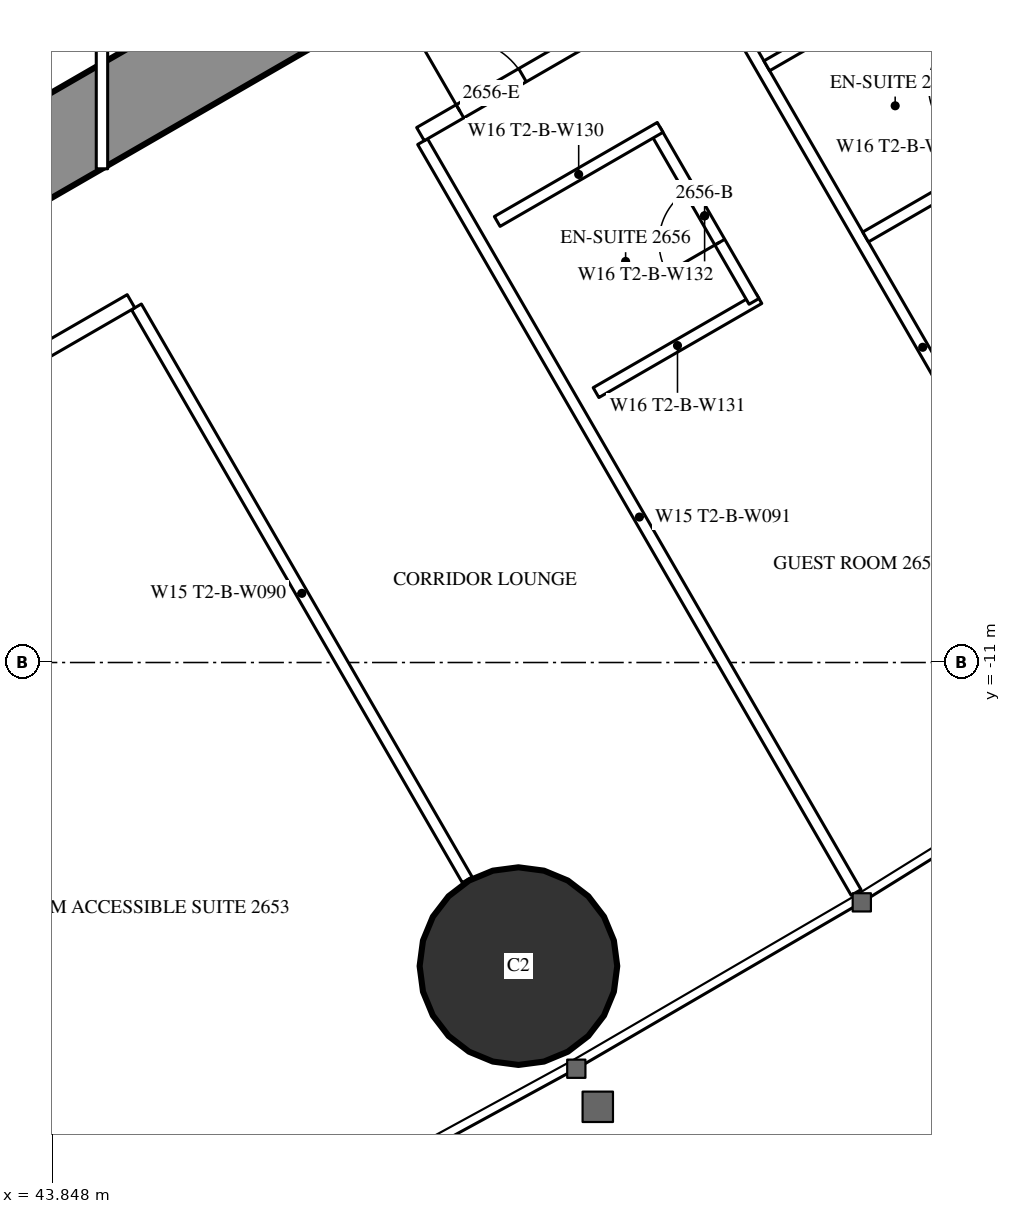
"""IFC4 building model, lengths in metres.
Left out: names, types, materials, properties, quantities, classifications, styles, units other than length and angle.
Written with IfcOpenShell. Run it as: python <this file> out.ifc"""

import sys

from ifc_helpers import new_model, si_unit, direction, frame, frame_2d, origin, origin_2d, place, context, subcontext, project, spatial, rectangle, hollow_circle, extrude, element, fill, save


model = new_model("IFC4")
c1 = context("Model", 3, precision=1e-05, world=origin(), true_north=direction((0.0, 1.0)))
c2 = subcontext(c1, "Body", "Model", "MODEL_VIEW")
j1 = project(units=[si_unit("LENGTHUNIT", "METRE"), si_unit("PLANEANGLEUNIT", "RADIAN")], contexts=[c1])
p1 = place(None, origin())
s1 = spatial("IfcSite", under=j1, at=p1, CompositionType="ELEMENT")
p2 = place(p1, origin())
s2 = spatial("IfcBuilding", under=s1, at=p2, CompositionType="ELEMENT")
p3 = place(p2, frame((0.0, 0.0, 101.1)))
s3 = spatial("IfcBuildingStorey", under=s2, at=p3, CompositionType="ELEMENT", Elevation=101.1)
p4 = place(p3, frame((49.979, -14.994, 0.0), z_axis=(0.0, 0.0, 1.0), x_axis=(1.0, 0.0, 0.0)))
e1 = element("IfcColumn", 1, at=p4, inside=s3, PredefinedType="COLUMN", context=c2, shape_type="SweptSolid", body=[
    extrude(hollow_circle(Radius=1.3, WallThickness=0.1, at=origin_2d()), origin(), (0.0, 0.0, 1.0), 3.5),
])
p5 = place(p3, frame((27.2, -13.8, 0.0), z_axis=(0.0, 0.0, 1.0), x_axis=(0.866027159892, 0.499996958321, 0.0)))
e2 = element("IfcWall", 2, at=p5, inside=s3, PredefinedType="SHEAR", context=c2, shape_type="SweptSolid", body=[
    extrude(rectangle(XDim=27.947, YDim=1.2, at=frame_2d((13.973, 0.0))), origin(), (0.0, 0.0, 1.0), 3.5),
])
p6 = place(p5, frame((4.6, 0.0, 0.0)))
e3 = element("IfcOpeningElement", 3, at=p6, cuts=e2, PredefinedType="OPENING", context=c2, shape_type="SweptSolid", body=[
    extrude(rectangle(XDim=1.0, YDim=2.2, at=frame_2d((0.5, 1.1))), frame((0.0, 0.61, 0.0), z_axis=(0.0, -1.0, 0.0), x_axis=(1.0, 0.0, 0.0)), (0.0, 0.0, 1.0), 1.22),
])
p7 = place(p5, frame((13.395, 0.0, 0.0)))
e4 = element("IfcOpeningElement", 4, at=p7, cuts=e2, PredefinedType="OPENING", context=c2, shape_type="SweptSolid", body=[
    extrude(rectangle(XDim=1.8, YDim=2.2, at=frame_2d((0.9, 1.1))), frame((0.0, 0.61, 0.0), z_axis=(0.0, -1.0, 0.0), x_axis=(1.0, 0.0, 0.0)), (0.0, 0.0, 1.0), 1.22),
])
p8 = place(p3, frame((44.954, -6.321, 0.0), z_axis=(0.0, 0.0, 1.0), x_axis=(0.500018676722, -0.866014620505, 0.0)))
e5 = element("IfcWall", 5, at=p8, inside=s3, PredefinedType="PARTITIONING", context=c2, shape_type="SweptSolid", body=[
    extrude(rectangle(XDim=8.704, YDim=0.15, at=frame_2d((4.352, 0.0))), origin(), (0.0, 0.0, 1.0), 2.2),
])
p9 = place(p3, frame((48.719, -4.147, 0.0), z_axis=(0.0, 0.0, 1.0), x_axis=(0.499990498062, -0.866030889661, 0.0)))
e6 = element("IfcWall", 6, at=p9, inside=s3, PredefinedType="PARTITIONING", context=c2, shape_type="SweptSolid", body=[
    extrude(rectangle(XDim=11.406, YDim=0.15, at=frame_2d((5.703, 0.0))), origin(), (0.0, 0.0, 1.0), 3.25),
])
p10 = place(p3, frame((52.481, -1.975, 0.0), z_axis=(0.0, 0.0, 1.0), x_axis=(0.500003867771, -0.866023170714, 0.0)))
e7 = element("IfcWall", 7, at=p10, inside=s3, PredefinedType="PARTITIONING", context=c2, shape_type="SweptSolid", body=[
    extrude(rectangle(XDim=11.265, YDim=0.15, at=frame_2d((5.632, 0.0))), origin(), (0.0, 0.0, 1.0), 3.25),
])
p11 = place(p3, frame((37.96, -10.243, 0.0), z_axis=(0.0, 0.0, 1.0), x_axis=(0.86603350054, 0.499985975746, 0.0)))
e8 = element("IfcWall", 8, at=p11, inside=s3, PredefinedType="PARTITIONING", context=c2, shape_type="SweptSolid", body=[
    extrude(rectangle(XDim=7.993, YDim=0.2, at=frame_2d((3.997, 0.0))), origin(), (0.0, 0.0, 1.0), 3.25),
])
p12 = place(p11, frame((3.35, 0.0, 0.0)))
e9 = element("IfcOpeningElement", 9, at=p12, cuts=e8, PredefinedType="OPENING", context=c2, shape_type="SweptSolid", body=[
    extrude(rectangle(XDim=1.0, YDim=2.2, at=frame_2d((0.5, 1.1))), frame((0.0, 0.11, 0.0), z_axis=(0.0, -1.0, 0.0), x_axis=(1.0, 0.0, 0.0)), (0.0, 0.0, 1.0), 0.22),
])
p13 = place(p3, frame((48.69, -4.048, 0.0), z_axis=(0.0, 0.0, 1.0), x_axis=(0.866026410209, 0.499998256818, 0.0)))
e10 = element("IfcWall", 10, at=p13, inside=s3, PredefinedType="PARTITIONING", context=c2, shape_type="SweptSolid", body=[
    extrude(rectangle(XDim=8.097, YDim=0.2, at=frame_2d((4.048, 0.0))), origin(), (0.0, 0.0, 1.0), 3.25),
])
p14 = place(p13, frame((0.6, 0.0, 0.0)))
e11 = element("IfcOpeningElement", 11, at=p14, cuts=e10, PredefinedType="OPENING", context=c2, shape_type="SweptSolid", body=[
    extrude(rectangle(XDim=0.95, YDim=2.2, at=frame_2d((0.475, 1.1))), frame((0.0, 0.11, 0.0), z_axis=(0.0, -1.0, 0.0), x_axis=(1.0, 0.0, 0.0)), (0.0, 0.0, 1.0), 0.22),
])
p15 = place(p13, frame((4.695, 0.0, 0.0)))
e12 = element("IfcOpeningElement", 12, at=p15, cuts=e10, PredefinedType="OPENING", context=c2, shape_type="SweptSolid", body=[
    extrude(rectangle(XDim=0.95, YDim=2.2, at=frame_2d((0.475, 1.1))), frame((0.0, 0.11, 0.0), z_axis=(0.0, -1.0, 0.0), x_axis=(1.0, 0.0, 0.0)), (0.0, 0.0, 1.0), 0.22),
])
p16 = place(p3, frame((51.0, -7.449, 0.0), z_axis=(0.0, 0.0, 1.0), x_axis=(0.866006523861, 0.500032699561, 0.0)))
e13 = element("IfcWall", 13, at=p16, inside=s3, PredefinedType="PARTITIONING", context=c2, shape_type="SweptSolid", body=[
    extrude(rectangle(XDim=2.475, YDim=0.15, at=frame_2d((1.237, 0.0))), origin(), (0.0, 0.0, 1.0), 3.25),
])
p17 = place(p3, frame((51.778, -3.998, 0.0), z_axis=(0.0, 0.0, 1.0), x_axis=(0.500047596559, -0.865997922154, 0.0)))
e14 = element("IfcWall", 14, at=p17, inside=s3, PredefinedType="PARTITIONING", context=c2, shape_type="SweptSolid", body=[
    extrude(rectangle(XDim=2.6, YDim=0.15, at=frame_2d((1.3, 0.0))), origin(), (0.0, 0.0, 1.0), 3.25),
])
p18 = place(p17, frame((0.9, 0.0, 0.0)))
e15 = element("IfcOpeningElement", 15, at=p18, cuts=e14, PredefinedType="OPENING", context=c2, shape_type="SweptSolid", body=[
    extrude(rectangle(XDim=0.8, YDim=2.2, at=frame_2d((0.4, 1.1))), frame((0.0, 0.085, 0.0), z_axis=(0.0, -1.0, 0.0), x_axis=(1.0, 0.0, 0.0)), (0.0, 0.0, 1.0), 0.17),
])
for number, where, z_axis, x_axis in (
    (16, (49.7, -5.198, 0.0), (0.0, 0.0, 1.0), (0.866, 0.5, 0.0)),
    (17, (54.546, -5.402, 0.0), (0.0, 0.0, 1.0), (0.866, 0.5, 0.0)),
):
    element("IfcWall", number, at=place(p3, frame(where, z_axis=z_axis, x_axis=x_axis)), inside=s3, PredefinedType="PARTITIONING", context=c2, shape_type="SweptSolid", body=[
        extrude(rectangle(XDim=2.475, YDim=0.15, at=frame_2d((1.237, 0.0))), origin(), (0.0, 0.0, 1.0), 3.25),
    ])
p19 = place(p3, frame((55.325, -1.95, 0.0), z_axis=(0.0, 0.0, 1.0), x_axis=(0.500006934395, -0.866021400173, 0.0)))
e18 = element("IfcWall", 18, at=p19, inside=s3, PredefinedType="PARTITIONING", context=c2, shape_type="SweptSolid", body=[
    extrude(rectangle(XDim=2.6, YDim=0.15, at=frame_2d((1.3, 0.0))), origin(), (0.0, 0.0, 1.0), 3.25),
])
p20 = place(p19, frame((0.9, 0.0, 0.0)))
e19 = element("IfcOpeningElement", 19, at=p20, cuts=e18, PredefinedType="OPENING", context=c2, shape_type="SweptSolid", body=[
    extrude(rectangle(XDim=0.8, YDim=2.2, at=frame_2d((0.4, 1.1))), frame((0.0, 0.085, 0.0), z_axis=(0.0, -1.0, 0.0), x_axis=(1.0, 0.0, 0.0)), (0.0, 0.0, 1.0), 0.17),
])
p21 = place(p3, frame((53.246, -3.15, 0.0), z_axis=(0.0, 0.0, 1.0), x_axis=(0.866006523861, 0.500032699561, 0.0)))
e20 = element("IfcWall", 20, at=p21, inside=s3, PredefinedType="PARTITIONING", context=c2, shape_type="SweptSolid", body=[
    extrude(rectangle(XDim=2.475, YDim=0.15, at=frame_2d((1.237, 0.0))), origin(), (0.0, 0.0, 1.0), 3.25),
])
p22 = place(p3, frame((44.5, -4.505, 0.0), z_axis=(0.0, 0.0, 1.0), x_axis=(0.0, 1.0, 0.0)))
e21 = element("IfcWall", 21, at=p22, inside=s3, PredefinedType="PARTITIONING", context=c2, shape_type="SweptSolid", body=[
    extrude(rectangle(XDim=9.009, YDim=0.15, at=frame_2d((4.505, 0.0))), origin(), (0.0, 0.0, 1.0), 2.45),
])
p23 = place(p22, frame((4.005, 0.0, 0.0)))
e22 = element("IfcOpeningElement", 22, at=p23, cuts=e21, PredefinedType="OPENING", context=c2, shape_type="SweptSolid", body=[
    extrude(rectangle(XDim=1.0, YDim=2.2, at=frame_2d((0.5, 1.1))), frame((0.0, 0.085, 0.0), z_axis=(0.0, -1.0, 0.0), x_axis=(1.0, 0.0, 0.0)), (0.0, 0.0, 1.0), 0.17),
])
p24 = place(p18, origin())
e23 = element("IfcDoor", 23, at=p24, inside=s3, OperationType="SINGLE_SWING_RIGHT", PredefinedType="DOOR", context=c2, shape_type="SweptSolid", body=[
    extrude(rectangle(XDim=0.8, YDim=2.2, at=frame_2d((0.4, 1.1))), frame((0.0, 0.025, 0.0), z_axis=(0.0, -1.0, 0.0), x_axis=(1.0, 0.0, 0.0)), (0.0, 0.0, 1.0), 0.05),
])
fill(e15, e23)
p25 = place(p14, origin())
e24 = element("IfcDoor", 24, at=p25, inside=s3, OperationType="SINGLE_SWING_LEFT", PredefinedType="DOOR", context=c2, shape_type="SweptSolid", body=[
    extrude(rectangle(XDim=0.95, YDim=2.2, at=frame_2d((0.475, 1.1))), frame((0.0, 0.025, 0.0), z_axis=(0.0, -1.0, 0.0), x_axis=(1.0, 0.0, 0.0)), (0.0, 0.0, 1.0), 0.05),
])
fill(e11, e24)
save(model, sys.argv[1])
